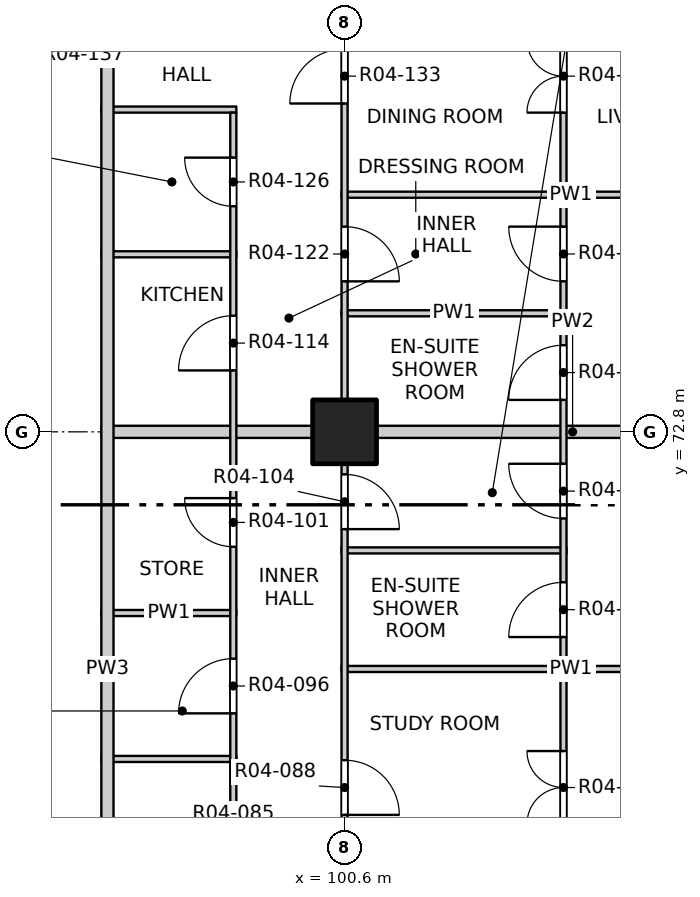
"""IFC4 building model, lengths in metres.
Left out: names, types, materials, properties, quantities, classifications, styles, units other than length and angle.
Written with IfcOpenShell. Run it as: python <this file> out.ifc"""

import sys

from ifc_helpers import new_model, si_unit, direction, frame, frame_2d, origin, origin_2d, place, context, subcontext, project, spatial, rectangle, extrude, element, fill, save


model = new_model("IFC4")
c1 = context("Model", 3, precision=1e-05, world=origin(), true_north=direction((0.0, 1.0)))
c2 = subcontext(c1, "Body", "Model", "MODEL_VIEW")
j1 = project(units=[si_unit("LENGTHUNIT", "METRE"), si_unit("PLANEANGLEUNIT", "RADIAN")], contexts=[c1])
p1 = place(None, origin())
s1 = spatial("IfcSite", under=j1, at=p1, CompositionType="ELEMENT")
p2 = place(p1, origin())
s2 = spatial("IfcBuilding", under=s1, at=p2, CompositionType="ELEMENT")
p3 = place(p2, frame((0.0, 0.0, 58.0)))
s3 = spatial("IfcBuildingStorey", under=s2, at=p3, CompositionType="ELEMENT", Elevation=58.0)
p4 = place(p3, frame((100.6, 72.8, -0.25), z_axis=(0.0, 0.0, 1.0), x_axis=(1.0, 0.0, 0.0)))
e1 = element("IfcColumn", 1, at=p4, inside=s3, PredefinedType="COLUMN", context=c2, shape_type="SweptSolid", body=[
    extrude(rectangle(XDim=1.05, YDim=1.05, at=origin_2d()), origin(), (0.0, 0.0, 1.0), 3.4),
])
p5 = place(p3, frame((96.6, 67.42, 0.0), z_axis=(0.0, 0.0, 1.0), x_axis=(1.0, 0.0, 0.0)))
e2 = element("IfcWall", 2, at=p5, inside=s3, PredefinedType="PARTITIONING", context=c2, shape_type="SweptSolid", body=[
    extrude(rectangle(XDim=2.22, YDim=0.1, at=frame_2d((1.11, 0.0))), origin(), (0.0, 0.0, 1.0), 3.15),
])
p6 = place(p3, frame((100.55, 68.9, 0.0), z_axis=(0.0, 0.0, 1.0), x_axis=(1.0, 0.0, 0.0)))
e3 = element("IfcWall", 3, at=p6, inside=s3, PredefinedType="PARTITIONING", context=c2, shape_type="SweptSolid", body=[
    extrude(rectangle(XDim=7.55, YDim=0.1, at=frame_2d((3.775, 0.0))), origin(), (0.0, 0.0, 1.0), 3.15),
])
p7 = place(p3, frame((96.6, 69.82, 0.0), z_axis=(0.0, 0.0, 1.0), x_axis=(1.0, 0.0, 0.0)))
e4 = element("IfcWall", 4, at=p7, inside=s3, PredefinedType="PARTITIONING", context=c2, shape_type="SweptSolid", body=[
    extrude(rectangle(XDim=2.22, YDim=0.1, at=frame_2d((1.11, 0.0))), origin(), (0.0, 0.0, 1.0), 3.15),
])
p8 = place(p3, frame((100.55, 70.85, 0.0), z_axis=(0.0, 0.0, 1.0), x_axis=(1.0, 0.0, 0.0)))
e5 = element("IfcWall", 5, at=p8, inside=s3, PredefinedType="PARTITIONING", context=c2, shape_type="SweptSolid", body=[
    extrude(rectangle(XDim=3.7, YDim=0.1, at=frame_2d((1.85, 0.0))), origin(), (0.0, 0.0, 1.0), 3.15),
])
p9 = place(p3, frame((96.6, 72.8, 0.0), z_axis=(0.0, 0.0, 1.0), x_axis=(1.0, 0.0, 0.0)))
e6 = element("IfcWall", 6, at=p9, inside=s3, PredefinedType="PARTITIONING", context=c2, shape_type="SweptSolid", body=[
    extrude(rectangle(XDim=4.0, YDim=0.2, at=frame_2d((2.0, 0.0))), origin(), (0.0, 0.0, 1.0), 3.15),
])
p10 = place(p3, frame((100.6, 72.8, 0.0), z_axis=(0.0, 0.0, 1.0), x_axis=(1.0, 0.0, 0.0)))
e7 = element("IfcWall", 7, at=p10, inside=s3, PredefinedType="PARTITIONING", context=c2, shape_type="SweptSolid", body=[
    extrude(rectangle(XDim=7.5, YDim=0.2, at=frame_2d((3.75, 0.0))), origin(), (0.0, 0.0, 1.0), 2.55),
])
p11 = place(p3, frame((100.55, 74.75, 0.0), z_axis=(0.0, 0.0, 1.0), x_axis=(1.0, 0.0, 0.0)))
e8 = element("IfcWall", 8, at=p11, inside=s3, PredefinedType="PARTITIONING", context=c2, shape_type="SweptSolid", body=[
    extrude(rectangle(XDim=3.7, YDim=0.1, at=frame_2d((1.85, 0.0))), origin(), (0.0, 0.0, 1.0), 3.15),
])
p12 = place(p3, frame((96.6, 75.72, 0.0), z_axis=(0.0, 0.0, 1.0), x_axis=(1.0, 0.0, 0.0)))
e9 = element("IfcWall", 9, at=p12, inside=s3, PredefinedType="PARTITIONING", context=c2, shape_type="SweptSolid", body=[
    extrude(rectangle(XDim=2.22, YDim=0.1, at=frame_2d((1.11, 0.0))), origin(), (0.0, 0.0, 1.0), 3.15),
])
p13 = place(p3, frame((100.55, 76.7, 0.0), z_axis=(0.0, 0.0, 1.0), x_axis=(1.0, 0.0, 0.0)))
e10 = element("IfcWall", 10, at=p13, inside=s3, PredefinedType="PARTITIONING", context=c2, shape_type="SweptSolid", body=[
    extrude(rectangle(XDim=7.55, YDim=0.1, at=frame_2d((3.775, 0.0))), origin(), (0.0, 0.0, 1.0), 3.15),
])
p14 = place(p3, frame((96.6, 78.1, 0.0), z_axis=(0.0, 0.0, 1.0), x_axis=(1.0, 0.0, 0.0)))
e11 = element("IfcWall", 11, at=p14, inside=s3, PredefinedType="PARTITIONING", context=c2, shape_type="SweptSolid", body=[
    extrude(rectangle(XDim=2.22, YDim=0.1, at=frame_2d((1.11, 0.0))), origin(), (0.0, 0.0, 1.0), 3.15),
])
p15 = place(p3, frame((96.7, 53.4, 0.0), z_axis=(0.0, 0.0, 1.0), x_axis=(0.0, 1.0, 0.0)))
e12 = element("IfcWall", 12, at=p15, inside=s3, PredefinedType="PARTITIONING", context=c2, shape_type="SweptSolid", body=[
    extrude(rectangle(XDim=31.0, YDim=0.2, at=frame_2d((15.5, 0.0))), origin(), (0.0, 0.0, 1.0), 3.15),
])
p16 = place(p15, frame((3.525, 0.0, 0.0)))
e13 = element("IfcOpeningElement", 13, at=p16, cuts=e12, PredefinedType="OPENING", context=c2, shape_type="SweptSolid", body=[
    extrude(rectangle(XDim=1.0, YDim=2.1, at=frame_2d((0.5, 1.05))), frame((0.0, 0.11, 0.0), z_axis=(0.0, -1.0, 0.0), x_axis=(1.0, 0.0, 0.0)), (0.0, 0.0, 1.0), 0.22),
])
p17 = place(p15, frame((10.825, 0.0, 0.0)))
e14 = element("IfcOpeningElement", 14, at=p17, cuts=e12, PredefinedType="OPENING", context=c2, shape_type="SweptSolid", body=[
    extrude(rectangle(XDim=1.0, YDim=2.1, at=frame_2d((0.5, 1.05))), frame((0.0, 0.11, 0.0), z_axis=(0.0, -1.0, 0.0), x_axis=(1.0, 0.0, 0.0)), (0.0, 0.0, 1.0), 0.22),
])
p18 = place(p15, frame((25.975, 0.0, 0.0)))
e15 = element("IfcOpeningElement", 15, at=p18, cuts=e12, PredefinedType="OPENING", context=c2, shape_type="SweptSolid", body=[
    extrude(rectangle(XDim=1.0, YDim=2.1, at=frame_2d((0.5, 1.05))), frame((0.0, 0.11, 0.0), z_axis=(0.0, -1.0, 0.0), x_axis=(1.0, 0.0, 0.0)), (0.0, 0.0, 1.0), 0.22),
])
p19 = place(p3, frame((98.77, 64.1, 0.0), z_axis=(0.0, 0.0, 1.0), x_axis=(0.0, 1.0, 0.0)))
e16 = element("IfcWall", 16, at=p19, inside=s3, PredefinedType="PARTITIONING", context=c2, shape_type="SweptSolid", body=[
    extrude(rectangle(XDim=13.95, YDim=0.1, at=frame_2d((6.975, 0.0))), origin(), (0.0, 0.0, 1.0), 3.15),
])
p20 = place(p19, frame((1.185, 0.0, 0.0)))
e17 = element("IfcOpeningElement", 17, at=p20, cuts=e16, PredefinedType="OPENING", context=c2, shape_type="SweptSolid", body=[
    extrude(rectangle(XDim=0.9, YDim=2.1, at=frame_2d((0.45, 1.05))), frame((0.0, 0.06, 0.0), z_axis=(0.0, -1.0, 0.0), x_axis=(1.0, 0.0, 0.0)), (0.0, 0.0, 1.0), 0.12),
])
p21 = place(p19, frame((4.07, 0.0, 0.0)))
e18 = element("IfcOpeningElement", 18, at=p21, cuts=e16, PredefinedType="OPENING", context=c2, shape_type="SweptSolid", body=[
    extrude(rectangle(XDim=0.9, YDim=2.1, at=frame_2d((0.45, 1.05))), frame((0.0, 0.06, 0.0), z_axis=(0.0, -1.0, 0.0), x_axis=(1.0, 0.0, 0.0)), (0.0, 0.0, 1.0), 0.12),
])
p22 = place(p19, frame((6.81, 0.0, 0.0)))
e19 = element("IfcOpeningElement", 19, at=p22, cuts=e16, PredefinedType="OPENING", context=c2, shape_type="SweptSolid", body=[
    extrude(rectangle(XDim=0.8, YDim=2.1, at=frame_2d((0.4, 1.05))), frame((0.0, 0.06, 0.0), z_axis=(0.0, -1.0, 0.0), x_axis=(1.0, 0.0, 0.0)), (0.0, 0.0, 1.0), 0.12),
])
p23 = place(p19, frame((9.71, 0.0, 0.0)))
e20 = element("IfcOpeningElement", 20, at=p23, cuts=e16, PredefinedType="OPENING", context=c2, shape_type="SweptSolid", body=[
    extrude(rectangle(XDim=0.9, YDim=2.1, at=frame_2d((0.45, 1.05))), frame((0.0, 0.06, 0.0), z_axis=(0.0, -1.0, 0.0), x_axis=(1.0, 0.0, 0.0)), (0.0, 0.0, 1.0), 0.12),
])
p24 = place(p19, frame((12.41, 0.0, 0.0)))
e21 = element("IfcOpeningElement", 21, at=p24, cuts=e16, PredefinedType="OPENING", context=c2, shape_type="SweptSolid", body=[
    extrude(rectangle(XDim=0.8, YDim=2.1, at=frame_2d((0.4, 1.05))), frame((0.0, 0.06, 0.0), z_axis=(0.0, -1.0, 0.0), x_axis=(1.0, 0.0, 0.0)), (0.0, 0.0, 1.0), 0.12),
])
p25 = place(p3, frame((100.6, 49.4, 0.0), z_axis=(0.0, 0.0, 1.0), x_axis=(0.0, 1.0, 0.0)))
e22 = element("IfcWall", 22, at=p25, inside=s3, PredefinedType="PARTITIONING", context=c2, shape_type="SweptSolid", body=[
    extrude(rectangle(XDim=31.2, YDim=0.1, at=frame_2d((15.6, 0.0))), origin(), (0.0, 0.0, 1.0), 3.15),
])
p26 = place(p25, frame((2.475, 0.0, 0.0)))
e23 = element("IfcOpeningElement", 23, at=p26, cuts=e22, PredefinedType="OPENING", context=c2, shape_type="SweptSolid", body=[
    extrude(rectangle(XDim=0.9, YDim=2.1, at=frame_2d((0.45, 1.05))), frame((0.0, 0.06, 0.0), z_axis=(0.0, -1.0, 0.0), x_axis=(1.0, 0.0, 0.0)), (0.0, 0.0, 1.0), 0.12),
])
p27 = place(p25, frame((5.4, 0.0, 0.0)))
e24 = element("IfcOpeningElement", 24, at=p27, cuts=e22, PredefinedType="OPENING", context=c2, shape_type="SweptSolid", body=[
    extrude(rectangle(XDim=0.9, YDim=2.1, at=frame_2d((0.45, 1.05))), frame((0.0, 0.06, 0.0), z_axis=(0.0, -1.0, 0.0), x_axis=(1.0, 0.0, 0.0)), (0.0, 0.0, 1.0), 0.12),
])
p28 = place(p25, frame((10.275, 0.0, 0.0)))
e25 = element("IfcOpeningElement", 25, at=p28, cuts=e22, PredefinedType="OPENING", context=c2, shape_type="SweptSolid", body=[
    extrude(rectangle(XDim=0.9, YDim=2.1, at=frame_2d((0.45, 1.05))), frame((0.0, 0.06, 0.0), z_axis=(0.0, -1.0, 0.0), x_axis=(1.0, 0.0, 0.0)), (0.0, 0.0, 1.0), 0.12),
])
p29 = place(p25, frame((13.2, 0.0, 0.0)))
e26 = element("IfcOpeningElement", 26, at=p29, cuts=e22, PredefinedType="OPENING", context=c2, shape_type="SweptSolid", body=[
    extrude(rectangle(XDim=0.9, YDim=2.1, at=frame_2d((0.45, 1.05))), frame((0.0, 0.06, 0.0), z_axis=(0.0, -1.0, 0.0), x_axis=(1.0, 0.0, 0.0)), (0.0, 0.0, 1.0), 0.12),
])
p30 = place(p25, frame((17.1, 0.0, 0.0)))
e27 = element("IfcOpeningElement", 27, at=p30, cuts=e22, PredefinedType="OPENING", context=c2, shape_type="SweptSolid", body=[
    extrude(rectangle(XDim=0.9, YDim=2.1, at=frame_2d((0.45, 1.05))), frame((0.0, 0.06, 0.0), z_axis=(0.0, -1.0, 0.0), x_axis=(1.0, 0.0, 0.0)), (0.0, 0.0, 1.0), 0.12),
])
p31 = place(p25, frame((21.8, 0.0, 0.0)))
e28 = element("IfcOpeningElement", 28, at=p31, cuts=e22, PredefinedType="OPENING", context=c2, shape_type="SweptSolid", body=[
    extrude(rectangle(XDim=0.9, YDim=2.1, at=frame_2d((0.45, 1.05))), frame((0.0, 0.06, 0.0), z_axis=(0.0, -1.0, 0.0), x_axis=(1.0, 0.0, 0.0)), (0.0, 0.0, 1.0), 0.12),
])
p32 = place(p25, frame((25.875, 0.0, 0.0)))
e29 = element("IfcOpeningElement", 29, at=p32, cuts=e22, PredefinedType="OPENING", context=c2, shape_type="SweptSolid", body=[
    extrude(rectangle(XDim=0.9, YDim=2.1, at=frame_2d((0.45, 1.05))), frame((0.0, 0.06, 0.0), z_axis=(0.0, -1.0, 0.0), x_axis=(1.0, 0.0, 0.0)), (0.0, 0.0, 1.0), 0.12),
])
p33 = place(p25, frame((28.8, 0.0, 0.0)))
e30 = element("IfcOpeningElement", 30, at=p33, cuts=e22, PredefinedType="OPENING", context=c2, shape_type="SweptSolid", body=[
    extrude(rectangle(XDim=0.9, YDim=2.1, at=frame_2d((0.45, 1.05))), frame((0.0, 0.06, 0.0), z_axis=(0.0, -1.0, 0.0), x_axis=(1.0, 0.0, 0.0)), (0.0, 0.0, 1.0), 0.12),
])
p34 = place(p3, frame((104.2, 41.9, 0.0), z_axis=(0.0, 0.0, 1.0), x_axis=(0.0, 1.0, 0.0)))
e31 = element("IfcWall", 31, at=p34, inside=s3, PredefinedType="PARTITIONING", context=c2, shape_type="SweptSolid", body=[
    extrude(rectangle(XDim=46.2, YDim=0.1, at=frame_2d((23.1, 0.0))), origin(), (0.0, 0.0, 1.0), 3.15),
])
p35 = place(p34, frame((1.05, 0.0, 0.0)))
e32 = element("IfcOpeningElement", 32, at=p35, cuts=e31, PredefinedType="OPENING", context=c2, shape_type="SweptSolid", body=[
    extrude(rectangle(XDim=1.2, YDim=2.1, at=frame_2d((0.6, 1.05))), frame((0.0, 0.06, 0.0), z_axis=(0.0, -1.0, 0.0), x_axis=(1.0, 0.0, 0.0)), (0.0, 0.0, 1.0), 0.12),
])
p36 = place(p34, frame((4.125, 0.0, 0.0)))
e33 = element("IfcOpeningElement", 33, at=p36, cuts=e31, PredefinedType="OPENING", context=c2, shape_type="SweptSolid", body=[
    extrude(rectangle(XDim=0.9, YDim=2.1, at=frame_2d((0.45, 1.05))), frame((0.0, 0.06, 0.0), z_axis=(0.0, -1.0, 0.0), x_axis=(1.0, 0.0, 0.0)), (0.0, 0.0, 1.0), 0.12),
])
p37 = place(p34, frame((6.075, 0.0, 0.0)))
e34 = element("IfcOpeningElement", 34, at=p37, cuts=e31, PredefinedType="OPENING", context=c2, shape_type="SweptSolid", body=[
    extrude(rectangle(XDim=0.9, YDim=2.1, at=frame_2d((0.45, 1.05))), frame((0.0, 0.06, 0.0), z_axis=(0.0, -1.0, 0.0), x_axis=(1.0, 0.0, 0.0)), (0.0, 0.0, 1.0), 0.12),
])
p38 = place(p34, frame((8.025, 0.0, 0.0)))
e35 = element("IfcOpeningElement", 35, at=p38, cuts=e31, PredefinedType="OPENING", context=c2, shape_type="SweptSolid", body=[
    extrude(rectangle(XDim=0.9, YDim=2.1, at=frame_2d((0.45, 1.05))), frame((0.0, 0.06, 0.0), z_axis=(0.0, -1.0, 0.0), x_axis=(1.0, 0.0, 0.0)), (0.0, 0.0, 1.0), 0.12),
])
p39 = place(p34, frame((9.975, 0.0, 0.0)))
e36 = element("IfcOpeningElement", 36, at=p39, cuts=e31, PredefinedType="OPENING", context=c2, shape_type="SweptSolid", body=[
    extrude(rectangle(XDim=0.9, YDim=2.1, at=frame_2d((0.45, 1.05))), frame((0.0, 0.06, 0.0), z_axis=(0.0, -1.0, 0.0), x_axis=(1.0, 0.0, 0.0)), (0.0, 0.0, 1.0), 0.12),
])
p40 = place(p34, frame((12.75, 0.0, 0.0)))
e37 = element("IfcOpeningElement", 37, at=p40, cuts=e31, PredefinedType="OPENING", context=c2, shape_type="SweptSolid", body=[
    extrude(rectangle(XDim=1.2, YDim=2.1, at=frame_2d((0.6, 1.05))), frame((0.0, 0.06, 0.0), z_axis=(0.0, -1.0, 0.0), x_axis=(1.0, 0.0, 0.0)), (0.0, 0.0, 1.0), 0.12),
])
p41 = place(p34, frame((15.825, 0.0, 0.0)))
e38 = element("IfcOpeningElement", 38, at=p41, cuts=e31, PredefinedType="OPENING", context=c2, shape_type="SweptSolid", body=[
    extrude(rectangle(XDim=0.9, YDim=2.1, at=frame_2d((0.45, 1.05))), frame((0.0, 0.06, 0.0), z_axis=(0.0, -1.0, 0.0), x_axis=(1.0, 0.0, 0.0)), (0.0, 0.0, 1.0), 0.12),
])
p42 = place(p34, frame((17.775, 0.0, 0.0)))
e39 = element("IfcOpeningElement", 39, at=p42, cuts=e31, PredefinedType="OPENING", context=c2, shape_type="SweptSolid", body=[
    extrude(rectangle(XDim=0.9, YDim=2.1, at=frame_2d((0.45, 1.05))), frame((0.0, 0.06, 0.0), z_axis=(0.0, -1.0, 0.0), x_axis=(1.0, 0.0, 0.0)), (0.0, 0.0, 1.0), 0.12),
])
p43 = place(p34, frame((20.55, 0.0, 0.0)))
e40 = element("IfcOpeningElement", 40, at=p43, cuts=e31, PredefinedType="OPENING", context=c2, shape_type="SweptSolid", body=[
    extrude(rectangle(XDim=1.2, YDim=2.1, at=frame_2d((0.6, 1.05))), frame((0.0, 0.06, 0.0), z_axis=(0.0, -1.0, 0.0), x_axis=(1.0, 0.0, 0.0)), (0.0, 0.0, 1.0), 0.12),
])
p44 = place(p34, frame((24.45, 0.0, 0.0)))
e41 = element("IfcOpeningElement", 41, at=p44, cuts=e31, PredefinedType="OPENING", context=c2, shape_type="SweptSolid", body=[
    extrude(rectangle(XDim=1.2, YDim=2.1, at=frame_2d((0.6, 1.05))), frame((0.0, 0.06, 0.0), z_axis=(0.0, -1.0, 0.0), x_axis=(1.0, 0.0, 0.0)), (0.0, 0.0, 1.0), 0.12),
])
p45 = place(p34, frame((27.525, 0.0, 0.0)))
e42 = element("IfcOpeningElement", 42, at=p45, cuts=e31, PredefinedType="OPENING", context=c2, shape_type="SweptSolid", body=[
    extrude(rectangle(XDim=0.9, YDim=2.1, at=frame_2d((0.45, 1.05))), frame((0.0, 0.06, 0.0), z_axis=(0.0, -1.0, 0.0), x_axis=(1.0, 0.0, 0.0)), (0.0, 0.0, 1.0), 0.12),
])
p46 = place(p34, frame((29.475, 0.0, 0.0)))
e43 = element("IfcOpeningElement", 43, at=p46, cuts=e31, PredefinedType="OPENING", context=c2, shape_type="SweptSolid", body=[
    extrude(rectangle(XDim=0.9, YDim=2.1, at=frame_2d((0.45, 1.05))), frame((0.0, 0.06, 0.0), z_axis=(0.0, -1.0, 0.0), x_axis=(1.0, 0.0, 0.0)), (0.0, 0.0, 1.0), 0.12),
])
p47 = place(p34, frame((31.425, 0.0, 0.0)))
e44 = element("IfcOpeningElement", 44, at=p47, cuts=e31, PredefinedType="OPENING", context=c2, shape_type="SweptSolid", body=[
    extrude(rectangle(XDim=0.9, YDim=2.1, at=frame_2d((0.45, 1.05))), frame((0.0, 0.06, 0.0), z_axis=(0.0, -1.0, 0.0), x_axis=(1.0, 0.0, 0.0)), (0.0, 0.0, 1.0), 0.12),
])
p48 = place(p34, frame((33.375, 0.0, 0.0)))
e45 = element("IfcOpeningElement", 45, at=p48, cuts=e31, PredefinedType="OPENING", context=c2, shape_type="SweptSolid", body=[
    extrude(rectangle(XDim=0.9, YDim=2.1, at=frame_2d((0.45, 1.05))), frame((0.0, 0.06, 0.0), z_axis=(0.0, -1.0, 0.0), x_axis=(1.0, 0.0, 0.0)), (0.0, 0.0, 1.0), 0.12),
])
p49 = place(p34, frame((36.15, 0.0, 0.0)))
e46 = element("IfcOpeningElement", 46, at=p49, cuts=e31, PredefinedType="OPENING", context=c2, shape_type="SweptSolid", body=[
    extrude(rectangle(XDim=1.2, YDim=2.1, at=frame_2d((0.6, 1.05))), frame((0.0, 0.06, 0.0), z_axis=(0.0, -1.0, 0.0), x_axis=(1.0, 0.0, 0.0)), (0.0, 0.0, 1.0), 0.12),
])
p50 = place(p34, frame((39.225, 0.0, 0.0)))
e47 = element("IfcOpeningElement", 47, at=p50, cuts=e31, PredefinedType="OPENING", context=c2, shape_type="SweptSolid", body=[
    extrude(rectangle(XDim=0.9, YDim=2.1, at=frame_2d((0.45, 1.05))), frame((0.0, 0.06, 0.0), z_axis=(0.0, -1.0, 0.0), x_axis=(1.0, 0.0, 0.0)), (0.0, 0.0, 1.0), 0.12),
])
p51 = place(p34, frame((41.175, 0.0, 0.0)))
e48 = element("IfcOpeningElement", 48, at=p51, cuts=e31, PredefinedType="OPENING", context=c2, shape_type="SweptSolid", body=[
    extrude(rectangle(XDim=0.9, YDim=2.1, at=frame_2d((0.45, 1.05))), frame((0.0, 0.06, 0.0), z_axis=(0.0, -1.0, 0.0), x_axis=(1.0, 0.0, 0.0)), (0.0, 0.0, 1.0), 0.12),
])
p52 = place(p34, frame((43.95, 0.0, 0.0)))
e49 = element("IfcOpeningElement", 49, at=p52, cuts=e31, PredefinedType="OPENING", context=c2, shape_type="SweptSolid", body=[
    extrude(rectangle(XDim=1.2, YDim=2.1, at=frame_2d((0.6, 1.05))), frame((0.0, 0.06, 0.0), z_axis=(0.0, -1.0, 0.0), x_axis=(1.0, 0.0, 0.0)), (0.0, 0.0, 1.0), 0.12),
])
p53 = place(p30, origin())
e50 = element("IfcDoor", 50, at=p53, inside=s3, OperationType="SINGLE_SWING_RIGHT", PredefinedType="DOOR", context=c2, shape_type="SweptSolid", body=[
    extrude(rectangle(XDim=0.9, YDim=2.1, at=frame_2d((0.45, 1.05))), frame((0.0, 0.025, 0.0), z_axis=(0.0, -1.0, 0.0), x_axis=(1.0, 0.0, 0.0)), (0.0, 0.0, 1.0), 0.05),
])
fill(e27, e50)
p54 = place(p44, origin())
e51 = element("IfcDoor", 51, at=p54, inside=s3, OperationType="DOUBLE_DOOR_SINGLE_SWING", PredefinedType="DOOR", context=c2, shape_type="SweptSolid", body=[
    extrude(rectangle(XDim=1.2, YDim=2.1, at=frame_2d((0.6, 1.05))), frame((0.0, 0.025, 0.0), z_axis=(0.0, -1.0, 0.0), x_axis=(1.0, 0.0, 0.0)), (0.0, 0.0, 1.0), 0.05),
])
fill(e41, e51)
p55 = place(p21, origin())
e52 = element("IfcDoor", 52, at=p55, inside=s3, OperationType="SINGLE_SWING_LEFT", PredefinedType="DOOR", context=c2, shape_type="SweptSolid", body=[
    extrude(rectangle(XDim=0.9, YDim=2.1, at=frame_2d((0.45, 1.05))), frame((0.0, 0.025, 0.0), z_axis=(0.0, -1.0, 0.0), x_axis=(1.0, 0.0, 0.0)), (0.0, 0.0, 1.0), 0.05),
])
fill(e18, e52)
p56 = place(p45, origin())
e53 = element("IfcDoor", 53, at=p56, inside=s3, OperationType="SINGLE_SWING_LEFT", PredefinedType="DOOR", context=c2, shape_type="SweptSolid", body=[
    extrude(rectangle(XDim=0.9, YDim=2.1, at=frame_2d((0.45, 1.05))), frame((0.0, 0.025, 0.0), z_axis=(0.0, -1.0, 0.0), x_axis=(1.0, 0.0, 0.0)), (0.0, 0.0, 1.0), 0.05),
])
fill(e42, e53)
p57 = place(p22, origin())
e54 = element("IfcDoor", 54, at=p57, inside=s3, OperationType="SINGLE_SWING_RIGHT", PredefinedType="DOOR", context=c2, shape_type="SweptSolid", body=[
    extrude(rectangle(XDim=0.8, YDim=2.1, at=frame_2d((0.4, 1.05))), frame((0.0, 0.025, 0.0), z_axis=(0.0, -1.0, 0.0), x_axis=(1.0, 0.0, 0.0)), (0.0, 0.0, 1.0), 0.05),
])
fill(e19, e54)
p58 = place(p31, origin())
e55 = element("IfcDoor", 55, at=p58, inside=s3, OperationType="SINGLE_SWING_RIGHT", PredefinedType="DOOR", context=c2, shape_type="SweptSolid", body=[
    extrude(rectangle(XDim=0.9, YDim=2.1, at=frame_2d((0.45, 1.05))), frame((0.0, 0.025, 0.0), z_axis=(0.0, -1.0, 0.0), x_axis=(1.0, 0.0, 0.0)), (0.0, 0.0, 1.0), 0.05),
])
fill(e28, e55)
p59 = place(p46, origin())
e56 = element("IfcDoor", 56, at=p59, inside=s3, OperationType="SINGLE_SWING_RIGHT", PredefinedType="DOOR", context=c2, shape_type="SweptSolid", body=[
    extrude(rectangle(XDim=0.9, YDim=2.1, at=frame_2d((0.45, 1.05))), frame((0.0, 0.025, 0.0), z_axis=(0.0, -1.0, 0.0), x_axis=(1.0, 0.0, 0.0)), (0.0, 0.0, 1.0), 0.05),
])
fill(e43, e56)
p60 = place(p47, origin())
e57 = element("IfcDoor", 57, at=p60, inside=s3, OperationType="SINGLE_SWING_LEFT", PredefinedType="DOOR", context=c2, shape_type="SweptSolid", body=[
    extrude(rectangle(XDim=0.9, YDim=2.1, at=frame_2d((0.45, 1.05))), frame((0.0, 0.025, 0.0), z_axis=(0.0, -1.0, 0.0), x_axis=(1.0, 0.0, 0.0)), (0.0, 0.0, 1.0), 0.05),
])
fill(e44, e57)
p61 = place(p23, origin())
e58 = element("IfcDoor", 58, at=p61, inside=s3, OperationType="SINGLE_SWING_LEFT", PredefinedType="DOOR", context=c2, shape_type="SweptSolid", body=[
    extrude(rectangle(XDim=0.9, YDim=2.1, at=frame_2d((0.45, 1.05))), frame((0.0, 0.025, 0.0), z_axis=(0.0, -1.0, 0.0), x_axis=(1.0, 0.0, 0.0)), (0.0, 0.0, 1.0), 0.05),
])
fill(e20, e58)
p62 = place(p32, origin())
e59 = element("IfcDoor", 59, at=p62, inside=s3, OperationType="SINGLE_SWING_RIGHT", PredefinedType="DOOR", context=c2, shape_type="SweptSolid", body=[
    extrude(rectangle(XDim=0.9, YDim=2.1, at=frame_2d((0.45, 1.05))), frame((0.0, 0.025, 0.0), z_axis=(0.0, -1.0, 0.0), x_axis=(1.0, 0.0, 0.0)), (0.0, 0.0, 1.0), 0.05),
])
fill(e29, e59)
p63 = place(p48, origin())
e60 = element("IfcDoor", 60, at=p63, inside=s3, OperationType="SINGLE_SWING_RIGHT", PredefinedType="DOOR", context=c2, shape_type="SweptSolid", body=[
    extrude(rectangle(XDim=0.9, YDim=2.1, at=frame_2d((0.45, 1.05))), frame((0.0, 0.025, 0.0), z_axis=(0.0, -1.0, 0.0), x_axis=(1.0, 0.0, 0.0)), (0.0, 0.0, 1.0), 0.05),
])
fill(e45, e60)
p64 = place(p24, origin())
e61 = element("IfcDoor", 61, at=p64, inside=s3, OperationType="SINGLE_SWING_RIGHT", PredefinedType="DOOR", context=c2, shape_type="SweptSolid", body=[
    extrude(rectangle(XDim=0.8, YDim=2.1, at=frame_2d((0.4, 1.05))), frame((0.0, 0.025, 0.0), z_axis=(0.0, -1.0, 0.0), x_axis=(1.0, 0.0, 0.0)), (0.0, 0.0, 1.0), 0.05),
])
fill(e21, e61)
p65 = place(p33, origin())
e62 = element("IfcDoor", 62, at=p65, inside=s3, OperationType="SINGLE_SWING_LEFT", PredefinedType="DOOR", context=c2, shape_type="SweptSolid", body=[
    extrude(rectangle(XDim=0.9, YDim=2.1, at=frame_2d((0.45, 1.05))), frame((0.0, 0.025, 0.0), z_axis=(0.0, -1.0, 0.0), x_axis=(1.0, 0.0, 0.0)), (0.0, 0.0, 1.0), 0.05),
])
fill(e30, e62)
p66 = place(p49, origin())
e63 = element("IfcDoor", 63, at=p66, inside=s3, OperationType="DOUBLE_DOOR_SINGLE_SWING", PredefinedType="DOOR", context=c2, shape_type="SweptSolid", body=[
    extrude(rectangle(XDim=1.2, YDim=2.1, at=frame_2d((0.6, 1.05))), frame((0.0, 0.025, 0.0), z_axis=(0.0, -1.0, 0.0), x_axis=(1.0, 0.0, 0.0)), (0.0, 0.0, 1.0), 0.05),
])
fill(e46, e63)
save(model, sys.argv[1])
